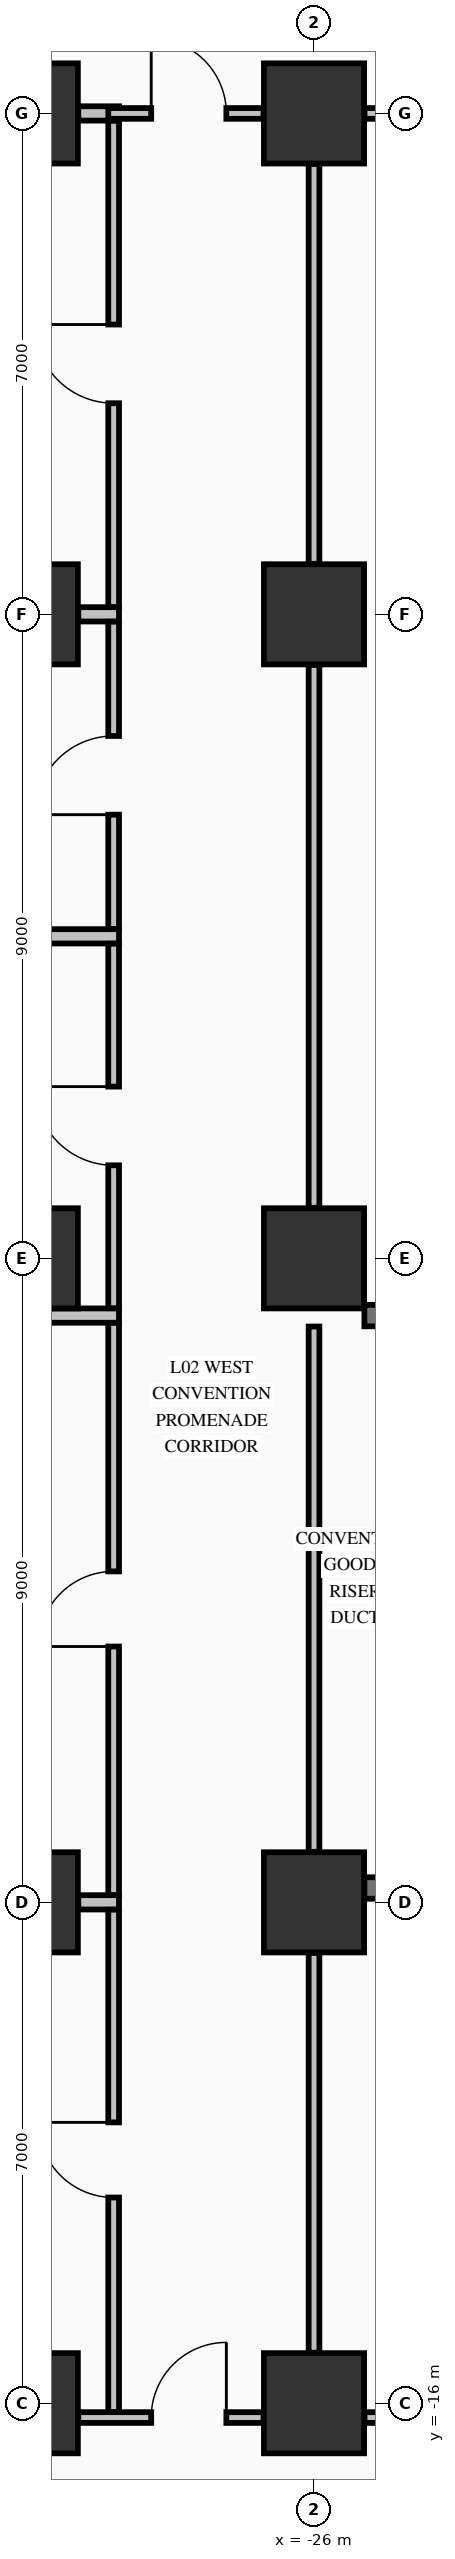
"""IFC4 building model, lengths in metres.
Left out: names, types, materials, properties, quantities, classifications, styles, units other than length and angle.
Written with IfcOpenShell. Run it as: python <this file> out.ifc"""

import sys

from ifc_helpers import new_model, si_unit, direction, frame, frame_2d, origin, origin_2d, place, context, subcontext, project, spatial, rectangle, extrude, element, fill, save


model = new_model("IFC4")
c1 = context("Model", 3, precision=1e-05, world=origin(), true_north=direction((0.0, 1.0)))
c2 = subcontext(c1, "Body", "Model", "MODEL_VIEW")
j1 = project(units=[si_unit("LENGTHUNIT", "METRE"), si_unit("PLANEANGLEUNIT", "RADIAN")], contexts=[c1])
p1 = place(None, origin())
s1 = spatial("IfcSite", under=j1, at=p1, CompositionType="ELEMENT")
p2 = place(p1, origin())
s2 = spatial("IfcBuilding", under=s1, at=p2, CompositionType="ELEMENT")
p3 = place(p2, frame((0.0, 0.0, 10.88)))
s3 = spatial("IfcBuildingStorey", under=s2, at=p3, CompositionType="ELEMENT", Elevation=10.88)
for number, where, z_axis, x_axis in (
    (1, (-30.0, -16.0, 0.0), (0.0, 0.0, 1.0), (1.0, 0.0, 0.0)),
    (2, (-30.0, -9.0, 0.0), (0.0, 0.0, 1.0), (1.0, 0.0, 0.0)),
    (3, (-30.0, 0.0, 0.0), (0.0, 0.0, 1.0), (1.0, 0.0, 0.0)),
    (4, (-30.0, 9.0, 0.0), (0.0, 0.0, 1.0), (1.0, 0.0, 0.0)),
    (5, (-30.0, 16.0, 0.0), (0.0, 0.0, 1.0), (1.0, 0.0, 0.0)),
    (6, (-26.0, -16.0, 0.0), (0.0, 0.0, 1.0), (1.0, 0.0, 0.0)),
    (7, (-26.0, -9.0, 0.0), (0.0, 0.0, 1.0), (1.0, 0.0, 0.0)),
    (8, (-26.0, 0.0, 0.0), (0.0, 0.0, 1.0), (1.0, 0.0, 0.0)),
    (9, (-26.0, 9.0, 0.0), (0.0, 0.0, 1.0), (1.0, 0.0, 0.0)),
    (10, (-26.0, 16.0, 0.0), (0.0, 0.0, 1.0), (1.0, 0.0, 0.0)),
):
    element("IfcColumn", number, at=place(p3, frame(where, z_axis=z_axis, x_axis=x_axis)), inside=s3, PredefinedType="COLUMN", context=c2, shape_type="SweptSolid", body=[
        extrude(rectangle(XDim=1.4, YDim=1.4, at=origin_2d()), origin(), (0.0, 0.0, 1.0), 5.09),
    ])
for number, where, z_axis, x_axis in (
    (11, (-25.296, -8.8, 0.0), (0.0, 0.0, 1.0), (1.0, 0.0, 0.0)),
    (12, (-25.296, -0.8, 0.0), (0.0, 0.0, 1.0), (1.0, 0.0, 0.0)),
):
    element("IfcWall", number, at=place(p3, frame(where, z_axis=z_axis, x_axis=x_axis)), inside=s3, PredefinedType="SHEAR", context=c2, shape_type="SweptSolid", body=[
        extrude(rectangle(XDim=3.046, YDim=0.3, at=frame_2d((1.523, 0.0))), origin(), (0.0, 0.0, 1.0), 5.09),
    ])
p4 = place(p3, frame((-29.294, -16.2, 0.0), z_axis=(0.0, 0.0, 1.0), x_axis=(1.0, 0.0, 0.0)))
e13 = element("IfcWall", 13, at=p4, inside=s3, PredefinedType="PARTITIONING", context=c2, shape_type="SweptSolid", body=[
    extrude(rectangle(XDim=2.588, YDim=0.15, at=frame_2d((1.294, 0.0))), origin(), (0.0, 0.0, 1.0), 4.132),
])
p5 = place(p4, frame((1.019, 0.0, 0.0)))
e14 = element("IfcOpeningElement", 14, at=p5, cuts=e13, PredefinedType="OPENING", context=c2, shape_type="SweptSolid", body=[
    extrude(rectangle(XDim=1.05, YDim=2.15, at=frame_2d((0.525, 1.075))), frame((0.0, 0.085, 0.0), z_axis=(0.0, -1.0, 0.0), x_axis=(1.0, 0.0, 0.0)), (0.0, 0.0, 1.0), 0.17),
])
p6 = place(p3, frame((-25.294, -16.2, 0.0), z_axis=(0.0, 0.0, 1.0), x_axis=(1.0, 0.0, 0.0)))
e15 = element("IfcWall", 15, at=p6, inside=s3, PredefinedType="PARTITIONING", context=c2, shape_type="SweptSolid", body=[
    extrude(rectangle(XDim=4.488, YDim=0.15, at=frame_2d((2.244, 0.0))), origin(), (0.0, 0.0, 1.0), 4.132),
])
p7 = place(p6, frame((0.619, 0.0, 0.0)))
e16 = element("IfcOpeningElement", 16, at=p7, cuts=e15, PredefinedType="OPENING", context=c2, shape_type="SweptSolid", body=[
    extrude(rectangle(XDim=0.95, YDim=2.15, at=frame_2d((0.475, 1.075))), frame((0.0, 0.085, 0.0), z_axis=(0.0, -1.0, 0.0), x_axis=(1.0, 0.0, 0.0)), (0.0, 0.0, 1.0), 0.17),
])
p8 = place(p3, frame((-29.294, -9.0, 0.0), z_axis=(0.0, 0.0, 1.0), x_axis=(1.0, 0.0, 0.0)))
e17 = element("IfcWall", 17, at=p8, inside=s3, PredefinedType="PARTITIONING", context=c2, shape_type="SweptSolid", body=[
    extrude(rectangle(XDim=0.569, YDim=0.2, at=frame_2d((0.284, 0.0))), origin(), (0.0, 0.0, 1.0), 4.132),
])
p9 = place(p3, frame((-33.835, -0.8, 0.0), z_axis=(0.0, 0.0, 1.0), x_axis=(1.0, 0.0, 0.0)))
e18 = element("IfcWall", 18, at=p9, inside=s3, PredefinedType="PARTITIONING", context=c2, shape_type="SweptSolid", body=[
    extrude(rectangle(XDim=5.11, YDim=0.2, at=frame_2d((2.555, 0.0))), origin(), (0.0, 0.0, 1.0), 5.09),
])
p10 = place(p3, frame((-33.835, 4.5, 0.0), z_axis=(0.0, 0.0, 1.0), x_axis=(1.0, 0.0, 0.0)))
e19 = element("IfcWall", 19, at=p10, inside=s3, PredefinedType="PARTITIONING", context=c2, shape_type="SweptSolid", body=[
    extrude(rectangle(XDim=5.11, YDim=0.2, at=frame_2d((2.555, 0.0))), origin(), (0.0, 0.0, 1.0), 4.48),
])
for number, where, z_axis, x_axis in (
    (20, (-29.294, 9.0, 0.0), (0.0, 0.0, 1.0), (1.0, 0.0, 0.0)),
    (21, (-29.294, 16.0, 0.0), (0.0, 0.0, 1.0), (1.0, 0.0, 0.0)),
):
    element("IfcWall", number, at=place(p3, frame(where, z_axis=z_axis, x_axis=x_axis)), inside=s3, PredefinedType="PARTITIONING", context=c2, shape_type="SweptSolid", body=[
        extrude(rectangle(XDim=0.569, YDim=0.2, at=frame_2d((0.284, 0.0))), origin(), (0.0, 0.0, 1.0), 4.132),
    ])
p11 = place(p3, frame((-28.875, 16.0, 0.0), z_axis=(0.0, 0.0, 1.0), x_axis=(1.0, 0.0, 0.0)))
e22 = element("IfcWall", 22, at=p11, inside=s3, PredefinedType="PARTITIONING", context=c2, shape_type="SweptSolid", body=[
    extrude(rectangle(XDim=2.169, YDim=0.15, at=frame_2d((1.084, 0.0))), origin(), (0.0, 0.0, 1.0), 4.132),
])
p12 = place(p11, frame((0.6, 0.0, 0.0)))
e23 = element("IfcOpeningElement", 23, at=p12, cuts=e22, PredefinedType="OPENING", context=c2, shape_type="SweptSolid", body=[
    extrude(rectangle(XDim=1.05, YDim=2.15, at=frame_2d((0.525, 1.075))), frame((0.0, 0.085, 0.0), z_axis=(0.0, -1.0, 0.0), x_axis=(1.0, 0.0, 0.0)), (0.0, 0.0, 1.0), 0.17),
])
p13 = place(p3, frame((-25.294, 16.0, 0.0), z_axis=(0.0, 0.0, 1.0), x_axis=(1.0, 0.0, 0.0)))
e24 = element("IfcWall", 24, at=p13, inside=s3, PredefinedType="PARTITIONING", context=c2, shape_type="SweptSolid", body=[
    extrude(rectangle(XDim=4.488, YDim=0.15, at=frame_2d((2.244, 0.0))), origin(), (0.0, 0.0, 1.0), 4.132),
])
p14 = place(p13, frame((3.238, 0.0, 0.0)))
e25 = element("IfcOpeningElement", 25, at=p14, cuts=e24, PredefinedType="OPENING", context=c2, shape_type="SweptSolid", body=[
    extrude(rectangle(XDim=1.1, YDim=2.15, at=frame_2d((0.55, 1.075))), frame((0.0, 0.085, 0.0), z_axis=(0.0, -1.0, 0.0), x_axis=(1.0, 0.0, 0.0)), (0.0, 0.0, 1.0), 0.17),
])
p15 = place(p3, frame((-28.8, -16.122, 0.0), z_axis=(0.0, 0.0, 1.0), x_axis=(0.0, 1.0, 0.0)))
e26 = element("IfcWall", 26, at=p15, inside=s3, PredefinedType="PARTITIONING", context=c2, shape_type="SweptSolid", body=[
    extrude(rectangle(XDim=7.019, YDim=0.15, at=frame_2d((3.51, 0.0))), origin(), (0.0, 0.0, 1.0), 5.09),
])
p16 = place(p15, frame((2.997, 0.0, 0.0)))
e27 = element("IfcOpeningElement", 27, at=p16, cuts=e26, PredefinedType="OPENING", context=c2, shape_type="SweptSolid", body=[
    extrude(rectangle(XDim=1.05, YDim=2.15, at=frame_2d((0.525, 1.075))), frame((0.0, 0.085, 0.0), z_axis=(0.0, -1.0, 0.0), x_axis=(1.0, 0.0, 0.0)), (0.0, 0.0, 1.0), 0.17),
])
p17 = place(p3, frame((-28.8, -8.897, 0.0), z_axis=(0.0, 0.0, 1.0), x_axis=(0.0, 1.0, 0.0)))
e28 = element("IfcWall", 28, at=p17, inside=s3, PredefinedType="PARTITIONING", context=c2, shape_type="SweptSolid", body=[
    extrude(rectangle(XDim=7.994, YDim=0.15, at=frame_2d((3.997, 0.0))), origin(), (0.0, 0.0, 1.0), 5.09),
])
p18 = place(p17, frame((3.472, 0.0, 0.0)))
e29 = element("IfcOpeningElement", 29, at=p18, cuts=e28, PredefinedType="OPENING", context=c2, shape_type="SweptSolid", body=[
    extrude(rectangle(XDim=1.05, YDim=2.15, at=frame_2d((0.525, 1.075))), frame((0.0, 0.085, 0.0), z_axis=(0.0, -1.0, 0.0), x_axis=(1.0, 0.0, 0.0)), (0.0, 0.0, 1.0), 0.17),
])
p19 = place(p3, frame((-28.8, -0.697, 0.0), z_axis=(0.0, 0.0, 1.0), x_axis=(0.0, 1.0, 0.0)))
e30 = element("IfcWall", 30, at=p19, inside=s3, PredefinedType="PARTITIONING", context=c2, shape_type="SweptSolid", body=[
    extrude(rectangle(XDim=5.094, YDim=0.15, at=frame_2d((2.547, 0.0))), origin(), (0.0, 0.0, 1.0), 5.09),
])
p20 = place(p19, frame((1.997, 0.0, 0.0)))
e31 = element("IfcOpeningElement", 31, at=p20, cuts=e30, PredefinedType="OPENING", context=c2, shape_type="SweptSolid", body=[
    extrude(rectangle(XDim=1.1, YDim=2.15, at=frame_2d((0.55, 1.075))), frame((0.0, 0.085, 0.0), z_axis=(0.0, -1.0, 0.0), x_axis=(1.0, 0.0, 0.0)), (0.0, 0.0, 1.0), 0.17),
])
p21 = place(p3, frame((-28.8, 4.603, 0.0), z_axis=(0.0, 0.0, 1.0), x_axis=(0.0, 1.0, 0.0)))
e32 = element("IfcWall", 32, at=p21, inside=s3, PredefinedType="PARTITIONING", context=c2, shape_type="SweptSolid", body=[
    extrude(rectangle(XDim=4.294, YDim=0.15, at=frame_2d((2.147, 0.0))), origin(), (0.0, 0.0, 1.0), 5.09),
])
p22 = place(p21, frame((1.597, 0.0, 0.0)))
e33 = element("IfcOpeningElement", 33, at=p22, cuts=e32, PredefinedType="OPENING", context=c2, shape_type="SweptSolid", body=[
    extrude(rectangle(XDim=1.1, YDim=2.15, at=frame_2d((0.55, 1.075))), frame((0.0, 0.085, 0.0), z_axis=(0.0, -1.0, 0.0), x_axis=(1.0, 0.0, 0.0)), (0.0, 0.0, 1.0), 0.17),
])
p23 = place(p3, frame((-28.8, 9.103, 0.0), z_axis=(0.0, 0.0, 1.0), x_axis=(0.0, 1.0, 0.0)))
e34 = element("IfcWall", 34, at=p23, inside=s3, PredefinedType="PARTITIONING", context=c2, shape_type="SweptSolid", body=[
    extrude(rectangle(XDim=6.794, YDim=0.15, at=frame_2d((3.397, 0.0))), origin(), (0.0, 0.0, 1.0), 5.09),
])
p24 = place(p23, frame((2.847, 0.0, 0.0)))
e35 = element("IfcOpeningElement", 35, at=p24, cuts=e34, PredefinedType="OPENING", context=c2, shape_type="SweptSolid", body=[
    extrude(rectangle(XDim=1.1, YDim=2.15, at=frame_2d((0.55, 1.075))), frame((0.0, 0.085, 0.0), z_axis=(0.0, -1.0, 0.0), x_axis=(1.0, 0.0, 0.0)), (0.0, 0.0, 1.0), 0.17),
])
p25 = place(p3, frame((-26.0, -15.294, 0.0), z_axis=(0.0, 0.0, 1.0), x_axis=(0.0, 1.0, 0.0)))
e36 = element("IfcWall", 36, at=p25, inside=s3, PredefinedType="PARTITIONING", context=c2, shape_type="SweptSolid", body=[
    extrude(rectangle(XDim=5.588, YDim=0.15, at=frame_2d((2.794, 0.0))), origin(), (0.0, 0.0, 1.0), 4.132),
])
p26 = place(p3, frame((-26.0, -8.294, 0.0), z_axis=(0.0, 0.0, 1.0), x_axis=(0.0, 1.0, 0.0)))
e37 = element("IfcWall", 37, at=p26, inside=s3, PredefinedType="PARTITIONING", context=c2, shape_type="SweptSolid", body=[
    extrude(rectangle(XDim=7.341, YDim=0.15, at=frame_2d((3.67, 0.0))), origin(), (0.0, 0.0, 1.0), 4.132),
])
p27 = place(p3, frame((-26.0, 0.706, 0.0), z_axis=(0.0, 0.0, 1.0), x_axis=(0.0, 1.0, 0.0)))
e38 = element("IfcWall", 38, at=p27, inside=s3, PredefinedType="PARTITIONING", context=c2, shape_type="SweptSolid", body=[
    extrude(rectangle(XDim=7.588, YDim=0.15, at=frame_2d((3.794, 0.0))), origin(), (0.0, 0.0, 1.0), 4.132),
])
p28 = place(p3, frame((-26.0, 9.706, 0.0), z_axis=(0.0, 0.0, 1.0), x_axis=(0.0, 1.0, 0.0)))
e39 = element("IfcWall", 39, at=p28, inside=s3, PredefinedType="PARTITIONING", context=c2, shape_type="SweptSolid", body=[
    extrude(rectangle(XDim=5.588, YDim=0.15, at=frame_2d((2.794, 0.0))), origin(), (0.0, 0.0, 1.0), 4.132),
])
p29 = place(p5, origin())
e40 = element("IfcDoor", 40, at=p29, inside=s3, OperationType="SINGLE_SWING_RIGHT", PredefinedType="DOOR", context=c2, shape_type="SweptSolid", body=[
    extrude(rectangle(XDim=1.05, YDim=2.15, at=frame_2d((0.525, 1.075))), frame((0.0, 0.025, 0.0), z_axis=(0.0, -1.0, 0.0), x_axis=(1.0, 0.0, 0.0)), (0.0, 0.0, 1.0), 0.05),
])
fill(e14, e40)
p30 = place(p12, origin())
e41 = element("IfcDoor", 41, at=p30, inside=s3, OperationType="SINGLE_SWING_LEFT", PredefinedType="DOOR", context=c2, shape_type="SweptSolid", body=[
    extrude(rectangle(XDim=1.05, YDim=2.15, at=frame_2d((0.525, 1.075))), frame((0.0, 0.025, 0.0), z_axis=(0.0, -1.0, 0.0), x_axis=(1.0, 0.0, 0.0)), (0.0, 0.0, 1.0), 0.05),
])
fill(e23, e41)
p31 = place(p16, origin())
e42 = element("IfcDoor", 42, at=p31, inside=s3, OperationType="SINGLE_SWING_RIGHT", PredefinedType="DOOR", context=c2, shape_type="SweptSolid", body=[
    extrude(rectangle(XDim=1.05, YDim=2.15, at=frame_2d((0.525, 1.075))), frame((0.0, 0.025, 0.0), z_axis=(0.0, -1.0, 0.0), x_axis=(1.0, 0.0, 0.0)), (0.0, 0.0, 1.0), 0.05),
])
fill(e27, e42)
p32 = place(p18, origin())
e43 = element("IfcDoor", 43, at=p32, inside=s3, OperationType="SINGLE_SWING_LEFT", PredefinedType="DOOR", context=c2, shape_type="SweptSolid", body=[
    extrude(rectangle(XDim=1.05, YDim=2.15, at=frame_2d((0.525, 1.075))), frame((0.0, 0.025, 0.0), z_axis=(0.0, -1.0, 0.0), x_axis=(1.0, 0.0, 0.0)), (0.0, 0.0, 1.0), 0.05),
])
fill(e29, e43)
p33 = place(p20, origin())
e44 = element("IfcDoor", 44, at=p33, inside=s3, OperationType="SINGLE_SWING_RIGHT", PredefinedType="DOOR", context=c2, shape_type="SweptSolid", body=[
    extrude(rectangle(XDim=1.1, YDim=2.15, at=frame_2d((0.55, 1.075))), frame((0.0, 0.025, 0.0), z_axis=(0.0, -1.0, 0.0), x_axis=(1.0, 0.0, 0.0)), (0.0, 0.0, 1.0), 0.05),
])
fill(e31, e44)
p34 = place(p22, origin())
e45 = element("IfcDoor", 45, at=p34, inside=s3, OperationType="SINGLE_SWING_LEFT", PredefinedType="DOOR", context=c2, shape_type="SweptSolid", body=[
    extrude(rectangle(XDim=1.1, YDim=2.15, at=frame_2d((0.55, 1.075))), frame((0.0, 0.025, 0.0), z_axis=(0.0, -1.0, 0.0), x_axis=(1.0, 0.0, 0.0)), (0.0, 0.0, 1.0), 0.05),
])
fill(e33, e45)
p35 = place(p24, origin())
e46 = element("IfcDoor", 46, at=p35, inside=s3, OperationType="SINGLE_SWING_RIGHT", PredefinedType="DOOR", context=c2, shape_type="SweptSolid", body=[
    extrude(rectangle(XDim=1.1, YDim=2.15, at=frame_2d((0.55, 1.075))), frame((0.0, 0.025, 0.0), z_axis=(0.0, -1.0, 0.0), x_axis=(1.0, 0.0, 0.0)), (0.0, 0.0, 1.0), 0.05),
])
fill(e35, e46)
save(model, sys.argv[1])
